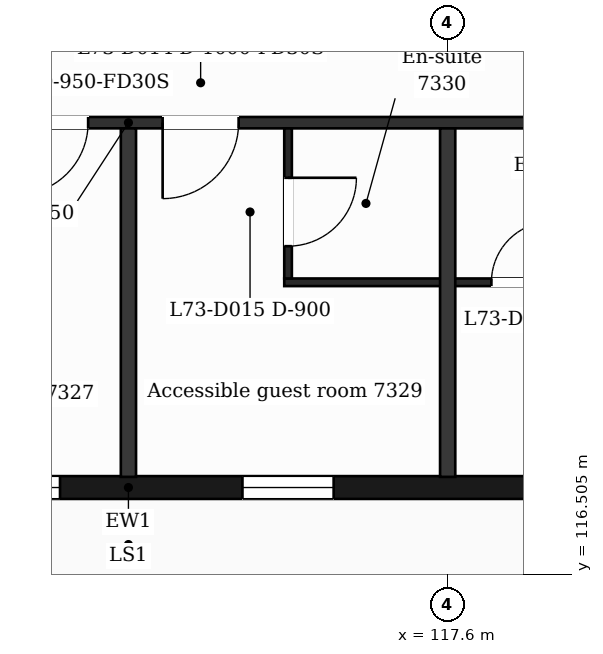
"""IFC4 building model, lengths in metres.
Left out: names, types, materials, properties, quantities, classifications, styles, units other than length and angle.
Written with IfcOpenShell. Run it as: python <this file> out.ifc"""

import sys

from ifc_helpers import new_model, si_unit, direction, frame, frame_2d, origin, place, context, subcontext, project, spatial, rectangle, extrude, element, fill, save


model = new_model("IFC4")
c1 = context("Model", 3, precision=1e-05, world=origin(), true_north=direction((0.0, 1.0)))
c2 = subcontext(c1, "Body", "Model", "MODEL_VIEW")
j1 = project(units=[si_unit("LENGTHUNIT", "METRE"), si_unit("PLANEANGLEUNIT", "RADIAN")], contexts=[c1])
p1 = place(None, origin())
s1 = spatial("IfcSite", under=j1, at=p1, CompositionType="ELEMENT")
p2 = place(p1, origin())
s2 = spatial("IfcBuilding", under=s1, at=p2, CompositionType="ELEMENT")
p3 = place(p2, frame((0.0, 0.0, 299.7)))
s3 = spatial("IfcBuildingStorey", under=s2, at=p3, CompositionType="ELEMENT", Elevation=299.7)
p4 = place(p3, frame((100.8, 117.65, 0.0), z_axis=(0.0, 0.0, 1.0), x_axis=(1.0, 0.0, 0.0)))
e1 = element("IfcWall", 1, at=p4, inside=s3, PredefinedType="SOLIDWALL", context=c2, shape_type="SweptSolid", body=[
    extrude(rectangle(XDim=25.2, YDim=0.3, at=frame_2d((12.6, 0.0))), origin(), (0.0, 0.0, 1.0), 3.25),
])
p5 = place(p4, frame((0.95, 0.0, 0.9)))
e2 = element("IfcOpeningElement", 2, at=p5, cuts=e1, PredefinedType="OPENING", context=c2, shape_type="SweptSolid", body=[
    extrude(rectangle(XDim=2.4, YDim=2.1, at=frame_2d((1.2, 1.05))), frame((0.0, 0.16, 0.0), z_axis=(0.0, -1.0, 0.0), x_axis=(1.0, 0.0, 0.0)), (0.0, 0.0, 1.0), 0.32),
])
p6 = place(p4, frame((5.1, 0.0, 0.9)))
e3 = element("IfcOpeningElement", 3, at=p6, cuts=e1, PredefinedType="OPENING", context=c2, shape_type="SweptSolid", body=[
    extrude(rectangle(XDim=2.4, YDim=2.1, at=frame_2d((1.2, 1.05))), frame((0.0, 0.16, 0.0), z_axis=(0.0, -1.0, 0.0), x_axis=(1.0, 0.0, 0.0)), (0.0, 0.0, 1.0), 0.32),
])
p7 = place(p4, frame((9.3, 0.0, 0.9)))
e4 = element("IfcOpeningElement", 4, at=p7, cuts=e1, PredefinedType="OPENING", context=c2, shape_type="SweptSolid", body=[
    extrude(rectangle(XDim=2.4, YDim=2.1, at=frame_2d((1.2, 1.05))), frame((0.0, 0.16, 0.0), z_axis=(0.0, -1.0, 0.0), x_axis=(1.0, 0.0, 0.0)), (0.0, 0.0, 1.0), 0.32),
])
p8 = place(p4, frame((14.1, 0.0, 0.9)))
e5 = element("IfcOpeningElement", 5, at=p8, cuts=e1, PredefinedType="OPENING", context=c2, shape_type="SweptSolid", body=[
    extrude(rectangle(XDim=1.2, YDim=2.1, at=frame_2d((0.6, 1.05))), frame((0.0, 0.16, 0.0), z_axis=(0.0, -1.0, 0.0), x_axis=(1.0, 0.0, 0.0)), (0.0, 0.0, 1.0), 0.32),
])
p9 = place(p4, frame((18.3, 0.0, 0.9)))
e6 = element("IfcOpeningElement", 6, at=p9, cuts=e1, PredefinedType="OPENING", context=c2, shape_type="SweptSolid", body=[
    extrude(rectangle(XDim=1.2, YDim=2.1, at=frame_2d((0.6, 1.05))), frame((0.0, 0.16, 0.0), z_axis=(0.0, -1.0, 0.0), x_axis=(1.0, 0.0, 0.0)), (0.0, 0.0, 1.0), 0.32),
])
p10 = place(p4, frame((21.75, 0.0, 0.0)))
e7 = element("IfcOpeningElement", 7, at=p10, cuts=e1, PredefinedType="OPENING", context=c2, shape_type="SweptSolid", body=[
    extrude(rectangle(XDim=1.2, YDim=2.4, at=frame_2d((0.6, 1.2))), frame((0.0, 0.16, 0.0), z_axis=(0.0, -1.0, 0.0), x_axis=(1.0, 0.0, 0.0)), (0.0, 0.0, 1.0), 0.32),
])
p11 = place(p4, frame((23.55, 0.0, 0.9)))
e8 = element("IfcOpeningElement", 8, at=p11, cuts=e1, PredefinedType="OPENING", context=c2, shape_type="SweptSolid", body=[
    extrude(rectangle(XDim=1.2, YDim=2.1, at=frame_2d((0.6, 1.05))), frame((0.0, 0.16, 0.0), z_axis=(0.0, -1.0, 0.0), x_axis=(1.0, 0.0, 0.0)), (0.0, 0.0, 1.0), 0.32),
])
p12 = place(p3, frame((115.45, 120.35, 0.0), z_axis=(0.0, 0.0, 1.0), x_axis=(1.0, 0.0, 0.0)))
e9 = element("IfcWall", 9, at=p12, inside=s3, PredefinedType="PARTITIONING", context=c2, shape_type="SweptSolid", body=[
    extrude(rectangle(XDim=4.6, YDim=0.1, at=frame_2d((2.3, 0.0))), origin(), (0.0, 0.0, 1.0), 3.25),
])
p13 = place(p12, frame((2.725, 0.0, 0.0)))
e10 = element("IfcOpeningElement", 10, at=p13, cuts=e9, PredefinedType="OPENING", context=c2, shape_type="SweptSolid", body=[
    extrude(rectangle(XDim=0.8, YDim=2.1, at=frame_2d((0.4, 1.05))), frame((0.0, 0.06, 0.0), z_axis=(0.0, -1.0, 0.0), x_axis=(1.0, 0.0, 0.0)), (0.0, 0.0, 1.0), 0.12),
])
p14 = place(p3, frame((100.8, 122.45, 0.0), z_axis=(0.0, 0.0, 1.0), x_axis=(1.0, 0.0, 0.0)))
e11 = element("IfcWall", 11, at=p14, inside=s3, PredefinedType="PARTITIONING", context=c2, shape_type="SweptSolid", body=[
    extrude(rectangle(XDim=25.2, YDim=0.15, at=frame_2d((12.6, 0.0))), origin(), (0.0, 0.0, 1.0), 3.25),
])
p15 = place(p14, frame((1.6, 0.0, 0.0)))
e12 = element("IfcOpeningElement", 12, at=p15, cuts=e11, PredefinedType="OPENING", context=c2, shape_type="SweptSolid", body=[
    extrude(rectangle(XDim=1.0, YDim=2.1, at=frame_2d((0.5, 1.05))), frame((0.0, 0.085, 0.0), z_axis=(0.0, -1.0, 0.0), x_axis=(1.0, 0.0, 0.0)), (0.0, 0.0, 1.0), 0.17),
])
p16 = place(p14, frame((11.12, 0.0, 0.0)))
e13 = element("IfcOpeningElement", 13, at=p16, cuts=e11, PredefinedType="OPENING", context=c2, shape_type="SweptSolid", body=[
    extrude(rectangle(XDim=0.95, YDim=2.1, at=frame_2d((0.475, 1.05))), frame((0.0, 0.085, 0.0), z_axis=(0.0, -1.0, 0.0), x_axis=(1.0, 0.0, 0.0)), (0.0, 0.0, 1.0), 0.17),
])
p17 = place(p14, frame((13.05, 0.0, 0.0)))
e14 = element("IfcOpeningElement", 14, at=p17, cuts=e11, PredefinedType="OPENING", context=c2, shape_type="SweptSolid", body=[
    extrude(rectangle(XDim=1.0, YDim=2.1, at=frame_2d((0.5, 1.05))), frame((0.0, 0.085, 0.0), z_axis=(0.0, -1.0, 0.0), x_axis=(1.0, 0.0, 0.0)), (0.0, 0.0, 1.0), 0.17),
])
p18 = place(p14, frame((19.61, 0.0, 0.0)))
e15 = element("IfcOpeningElement", 15, at=p18, cuts=e11, PredefinedType="OPENING", context=c2, shape_type="SweptSolid", body=[
    extrude(rectangle(XDim=0.95, YDim=2.1, at=frame_2d((0.475, 1.05))), frame((0.0, 0.085, 0.0), z_axis=(0.0, -1.0, 0.0), x_axis=(1.0, 0.0, 0.0)), (0.0, 0.0, 1.0), 0.17),
])
p19 = place(p14, frame((21.275, 0.0, 0.0)))
e16 = element("IfcOpeningElement", 16, at=p19, cuts=e11, PredefinedType="OPENING", context=c2, shape_type="SweptSolid", body=[
    extrude(rectangle(XDim=0.95, YDim=2.1, at=frame_2d((0.475, 1.05))), frame((0.0, 0.085, 0.0), z_axis=(0.0, -1.0, 0.0), x_axis=(1.0, 0.0, 0.0)), (0.0, 0.0, 1.0), 0.17),
])
p20 = place(p3, frame((113.4, 117.79, 0.0), z_axis=(0.0, 0.0, 1.0), x_axis=(0.0, 1.0, 0.0)))
e17 = element("IfcWall", 17, at=p20, inside=s3, PredefinedType="PARTITIONING", context=c2, shape_type="SweptSolid", body=[
    extrude(rectangle(XDim=4.585, YDim=0.2, at=frame_2d((2.292, 0.0))), origin(), (0.0, 0.0, 1.0), 3.25),
])
p21 = place(p3, frame((115.5, 120.4, 0.0), z_axis=(0.0, 0.0, 1.0), x_axis=(0.0, 1.0, 0.0)))
e18 = element("IfcWall", 18, at=p21, inside=s3, PredefinedType="PARTITIONING", context=c2, shape_type="SweptSolid", body=[
    extrude(rectangle(XDim=1.975, YDim=0.1, at=frame_2d((0.988, 0.0))), origin(), (0.0, 0.0, 1.0), 3.25),
])
p22 = place(p21, frame((0.425, 0.0, 0.0)))
e19 = element("IfcOpeningElement", 19, at=p22, cuts=e18, PredefinedType="OPENING", context=c2, shape_type="SweptSolid", body=[
    extrude(rectangle(XDim=0.9, YDim=2.1, at=frame_2d((0.45, 1.05))), frame((0.0, 0.06, 0.0), z_axis=(0.0, -1.0, 0.0), x_axis=(1.0, 0.0, 0.0)), (0.0, 0.0, 1.0), 0.12),
])
p23 = place(p3, frame((117.6, 117.79, 0.0), z_axis=(0.0, 0.0, 1.0), x_axis=(0.0, 1.0, 0.0)))
e20 = element("IfcWall", 20, at=p23, inside=s3, PredefinedType="PARTITIONING", context=c2, shape_type="SweptSolid", body=[
    extrude(rectangle(XDim=4.585, YDim=0.2, at=frame_2d((2.292, 0.0))), origin(), (0.0, 0.0, 1.0), 3.25),
])
p24 = place(p7, origin())
e21 = element("IfcWindow", 21, at=p24, inside=s3, PartitioningType="SINGLE_PANEL", PredefinedType="WINDOW", context=c2, shape_type="SweptSolid", body=[
    extrude(rectangle(XDim=2.4, YDim=2.1, at=frame_2d((1.2, 1.05))), frame((0.0, 0.03, 0.0), z_axis=(0.0, -1.0, 0.0), x_axis=(1.0, 0.0, 0.0)), (0.0, 0.0, 1.0), 0.06),
])
fill(e4, e21)
p25 = place(p8, origin())
e22 = element("IfcWindow", 22, at=p25, inside=s3, PartitioningType="SINGLE_PANEL", PredefinedType="WINDOW", context=c2, shape_type="SweptSolid", body=[
    extrude(rectangle(XDim=1.2, YDim=2.1, at=frame_2d((0.6, 1.05))), frame((0.0, 0.03, 0.0), z_axis=(0.0, -1.0, 0.0), x_axis=(1.0, 0.0, 0.0)), (0.0, 0.0, 1.0), 0.06),
])
fill(e5, e22)
p26 = place(p16, origin())
e23 = element("IfcDoor", 23, at=p26, inside=s3, OperationType="SINGLE_SWING_LEFT", PredefinedType="DOOR", context=c2, shape_type="SweptSolid", body=[
    extrude(rectangle(XDim=0.95, YDim=2.1, at=frame_2d((0.475, 1.05))), frame((0.0, 0.025, 0.0), z_axis=(0.0, -1.0, 0.0), x_axis=(1.0, 0.0, 0.0)), (0.0, 0.0, 1.0), 0.05),
])
fill(e13, e23)
p27 = place(p17, origin())
e24 = element("IfcDoor", 24, at=p27, inside=s3, OperationType="SINGLE_SWING_LEFT", PredefinedType="DOOR", context=c2, shape_type="SweptSolid", body=[
    extrude(rectangle(XDim=1.0, YDim=2.1, at=frame_2d((0.5, 1.05))), frame((0.0, 0.025, 0.0), z_axis=(0.0, -1.0, 0.0), x_axis=(1.0, 0.0, 0.0)), (0.0, 0.0, 1.0), 0.05),
])
fill(e14, e24)
p28 = place(p22, origin())
e25 = element("IfcDoor", 25, at=p28, inside=s3, OperationType="SINGLE_SWING_RIGHT", PredefinedType="DOOR", context=c2, shape_type="SweptSolid", body=[
    extrude(rectangle(XDim=0.9, YDim=2.1, at=frame_2d((0.45, 1.05))), frame((0.0, 0.025, 0.0), z_axis=(0.0, -1.0, 0.0), x_axis=(1.0, 0.0, 0.0)), (0.0, 0.0, 1.0), 0.05),
])
fill(e19, e25)
p29 = place(p13, origin())
e26 = element("IfcDoor", 26, at=p29, inside=s3, OperationType="SINGLE_SWING_RIGHT", PredefinedType="DOOR", context=c2, shape_type="SweptSolid", body=[
    extrude(rectangle(XDim=0.8, YDim=2.1, at=frame_2d((0.4, 1.05))), frame((0.0, 0.025, 0.0), z_axis=(0.0, -1.0, 0.0), x_axis=(1.0, 0.0, 0.0)), (0.0, 0.0, 1.0), 0.05),
])
fill(e10, e26)
save(model, sys.argv[1])
